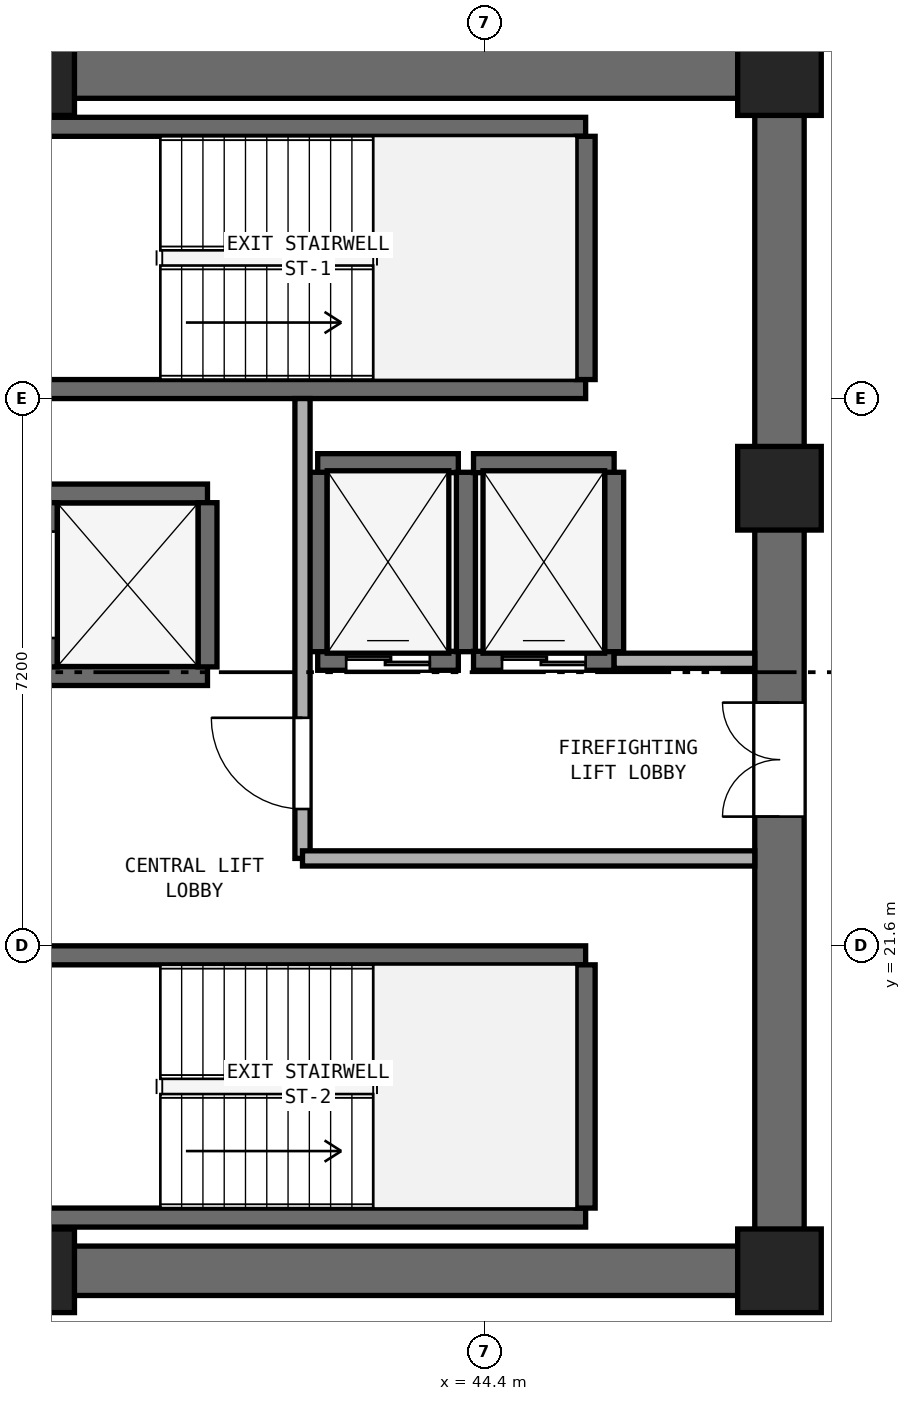
"""IFC4 building model, lengths in metres.
Left out: names, types, materials, properties, quantities, classifications, styles, units other than length and angle.
Written with IfcOpenShell. Run it as: python <this file> out.ifc"""

import sys

from ifc_helpers import new_model, si_unit, direction, frame, frame_2d, origin, origin_2d, place, context, subcontext, project, spatial, rectangle, extrude, element, fill, save


model = new_model("IFC4")
c1 = context("Model", 3, precision=1e-05, world=origin(), true_north=direction((0.0, 1.0)))
c2 = subcontext(c1, "Body", "Model", "MODEL_VIEW")
j1 = project(units=[si_unit("LENGTHUNIT", "METRE"), si_unit("PLANEANGLEUNIT", "RADIAN")], contexts=[c1])
p1 = place(None, origin())
s1 = spatial("IfcSite", under=j1, at=p1, CompositionType="ELEMENT")
p2 = place(p1, origin())
s2 = spatial("IfcBuilding", under=s1, at=p2, CompositionType="ELEMENT")
p3 = place(p2, frame((0.0, 0.0, 74.4)))
s3 = spatial("IfcBuildingStorey", under=s2, at=p3, CompositionType="ELEMENT", Elevation=74.4)
for number, where, z_axis, x_axis in (
    (1, (25.4, 17.325, 0.0), (0.0, 0.0, 1.0), (1.0, 0.0, 0.0)),
    (2, (25.4, 33.075, 0.0), (0.0, 0.0, 1.0), (1.0, 0.0, 0.0)),
):
    element("IfcWall", number, at=place(p3, frame(where, z_axis=z_axis, x_axis=x_axis)), inside=s3, PredefinedType="SHEAR", context=c2, shape_type="SweptSolid", body=[
        extrude(rectangle(XDim=23.2, YDim=0.65, at=frame_2d((11.6, 0.0))), origin(), (0.0, 0.0, 1.0), 3.525),
    ])
p4 = place(p3, frame((48.275, 17.65, 0.0), z_axis=(0.0, 0.0, 1.0), x_axis=(0.0, 1.0, 0.0)))
e3 = element("IfcWall", 3, at=p4, inside=s3, PredefinedType="SHEAR", context=c2, shape_type="SweptSolid", body=[
    extrude(rectangle(XDim=15.1, YDim=0.65, at=frame_2d((7.55, 0.0))), origin(), (0.0, 0.0, 1.0), 3.525),
])
p5 = place(p4, frame((5.65, 0.0, 0.0)))
e4 = element("IfcOpeningElement", 4, at=p5, cuts=e3, PredefinedType="OPENING", context=c2, shape_type="SweptSolid", body=[
    extrude(rectangle(XDim=1.5, YDim=2.15, at=frame_2d((0.75, 1.075))), frame((0.0, 0.335, 0.0), z_axis=(0.0, -1.0, 0.0), x_axis=(1.0, 0.0, 0.0)), (0.0, 0.0, 1.0), 0.67),
])
for number, where, z_axis, x_axis in (
    (5, (38.45, 17.325, 0.0), (0.0, 0.0, 1.0), (1.0, 0.0, 0.0)),
    (6, (48.275, 17.325, 0.0), (0.0, 0.0, 1.0), (1.0, 0.0, 0.0)),
    (7, (48.275, 27.62, 0.0), (0.0, 0.0, 1.0), (1.0, 0.0, 0.0)),
    (8, (48.275, 33.075, 0.0), (0.0, 0.0, 1.0), (1.0, 0.0, 0.0)),
    (9, (38.45, 33.075, 0.0), (0.0, 0.0, 1.0), (1.0, 0.0, 0.0)),
):
    element("IfcColumn", number, at=place(p3, frame(where, z_axis=z_axis, x_axis=x_axis)), inside=s3, PredefinedType="PILASTER", context=c2, shape_type="SweptSolid", body=[
        extrude(rectangle(XDim=1.1, YDim=1.1, at=origin_2d()), origin(), (0.0, 0.0, 1.0), 3.8),
    ])
for number, where, z_axis, x_axis in (
    (10, (38.425, 28.925, 0.0), (0.0, 0.0, 1.0), (1.0, 0.0, 0.0)),
    (11, (38.425, 32.375, 0.0), (0.0, 0.0, 1.0), (1.0, 0.0, 0.0)),
):
    element("IfcWall", number, at=place(p3, frame(where, z_axis=z_axis, x_axis=x_axis)), inside=s3, PredefinedType="SHEAR", context=c2, shape_type="SweptSolid", body=[
        extrude(rectangle(XDim=7.3, YDim=0.25, at=frame_2d((3.65, 0.0))), origin(), (0.0, 0.0, 1.0), 3.525),
    ])
p6 = place(p3, frame((45.725, 29.05, 0.0), z_axis=(0.0, 0.0, 1.0), x_axis=(0.0, 1.0, 0.0)))
e12 = element("IfcWall", 12, at=p6, inside=s3, PredefinedType="SHEAR", context=c2, shape_type="SweptSolid", body=[
    extrude(rectangle(XDim=3.2, YDim=0.25, at=frame_2d((1.6, 0.0))), origin(), (0.0, 0.0, 1.0), 3.525),
])
for number, where, z_axis, x_axis in (
    (13, (38.425, 18.025, 0.0), (0.0, 0.0, 1.0), (1.0, 0.0, 0.0)),
    (14, (38.425, 21.475, 0.0), (0.0, 0.0, 1.0), (1.0, 0.0, 0.0)),
):
    element("IfcWall", number, at=place(p3, frame(where, z_axis=z_axis, x_axis=x_axis)), inside=s3, PredefinedType="SHEAR", context=c2, shape_type="SweptSolid", body=[
        extrude(rectangle(XDim=7.3, YDim=0.25, at=frame_2d((3.65, 0.0))), origin(), (0.0, 0.0, 1.0), 3.525),
    ])
p7 = place(p3, frame((45.725, 18.15, 0.0), z_axis=(0.0, 0.0, 1.0), x_axis=(0.0, 1.0, 0.0)))
e15 = element("IfcWall", 15, at=p7, inside=s3, PredefinedType="SHEAR", context=c2, shape_type="SweptSolid", body=[
    extrude(rectangle(XDim=3.2, YDim=0.25, at=frame_2d((1.6, 0.0))), origin(), (0.0, 0.0, 1.0), 3.525),
])
p8 = place(p3, frame((42.2, 25.35, 0.0), z_axis=(0.0, 0.0, 1.0), x_axis=(1.0, 0.0, 0.0)))
e16 = element("IfcWall", 16, at=p8, inside=s3, PredefinedType="SHEAR", context=c2, shape_type="SweptSolid", body=[
    extrude(rectangle(XDim=1.85, YDim=0.25, at=frame_2d((0.925, 0.0))), origin(), (0.0, 0.0, 1.0), 3.525),
])
p9 = place(p8, frame((0.375, 0.0, 0.0)))
e17 = element("IfcOpeningElement", 17, at=p9, cuts=e16, PredefinedType="OPENING", context=c2, shape_type="SweptSolid", body=[
    extrude(rectangle(XDim=1.1, YDim=2.15, at=frame_2d((0.55, 1.075))), frame((0.0, 0.135, 0.0), z_axis=(0.0, -1.0, 0.0), x_axis=(1.0, 0.0, 0.0)), (0.0, 0.0, 1.0), 0.27),
])
p10 = place(p3, frame((42.2, 27.95, 0.0), z_axis=(0.0, 0.0, 1.0), x_axis=(1.0, 0.0, 0.0)))
e18 = element("IfcWall", 18, at=p10, inside=s3, PredefinedType="SHEAR", context=c2, shape_type="SweptSolid", body=[
    extrude(rectangle(XDim=1.85, YDim=0.25, at=frame_2d((0.925, 0.0))), origin(), (0.0, 0.0, 1.0), 3.525),
])
for number, where, z_axis, x_axis in (
    (19, (42.2, 25.47, 0.0), (0.0, 0.0, 1.0), (0.0, 1.0, 0.0)),
    (20, (44.15, 25.47, 0.0), (0.0, 0.0, 1.0), (0.0, 1.0, 0.0)),
):
    element("IfcWall", number, at=place(p3, frame(where, z_axis=z_axis, x_axis=x_axis)), inside=s3, PredefinedType="SHEAR", context=c2, shape_type="SweptSolid", body=[
        extrude(rectangle(XDim=2.36, YDim=0.25, at=frame_2d((1.18, 0.0))), origin(), (0.0, 0.0, 1.0), 3.525),
    ])
p11 = place(p3, frame((44.25, 25.35, 0.0), z_axis=(0.0, 0.0, 1.0), x_axis=(1.0, 0.0, 0.0)))
e21 = element("IfcWall", 21, at=p11, inside=s3, PredefinedType="SHEAR", context=c2, shape_type="SweptSolid", body=[
    extrude(rectangle(XDim=1.85, YDim=0.25, at=frame_2d((0.925, 0.0))), origin(), (0.0, 0.0, 1.0), 3.525),
])
p12 = place(p11, frame((0.375, 0.0, 0.0)))
e22 = element("IfcOpeningElement", 22, at=p12, cuts=e21, PredefinedType="OPENING", context=c2, shape_type="SweptSolid", body=[
    extrude(rectangle(XDim=1.1, YDim=2.15, at=frame_2d((0.55, 1.075))), frame((0.0, 0.135, 0.0), z_axis=(0.0, -1.0, 0.0), x_axis=(1.0, 0.0, 0.0)), (0.0, 0.0, 1.0), 0.27),
])
p13 = place(p3, frame((44.25, 27.95, 0.0), z_axis=(0.0, 0.0, 1.0), x_axis=(1.0, 0.0, 0.0)))
e23 = element("IfcWall", 23, at=p13, inside=s3, PredefinedType="SHEAR", context=c2, shape_type="SweptSolid", body=[
    extrude(rectangle(XDim=1.85, YDim=0.25, at=frame_2d((0.925, 0.0))), origin(), (0.0, 0.0, 1.0), 3.525),
])
p14 = place(p3, frame((46.1, 25.47, 0.0), z_axis=(0.0, 0.0, 1.0), x_axis=(0.0, 1.0, 0.0)))
e24 = element("IfcWall", 24, at=p14, inside=s3, PredefinedType="SHEAR", context=c2, shape_type="SweptSolid", body=[
    extrude(rectangle(XDim=2.36, YDim=0.25, at=frame_2d((1.18, 0.0))), origin(), (0.0, 0.0, 1.0), 3.525),
])
for number, where, z_axis, x_axis in (
    (25, (38.65, 25.15, 0.0), (0.0, 0.0, 1.0), (1.0, 0.0, 0.0)),
    (26, (38.65, 27.55, 0.0), (0.0, 0.0, 1.0), (1.0, 0.0, 0.0)),
):
    element("IfcWall", number, at=place(p3, frame(where, z_axis=z_axis, x_axis=x_axis)), inside=s3, PredefinedType="SHEAR", context=c2, shape_type="SweptSolid", body=[
        extrude(rectangle(XDim=2.1, YDim=0.25, at=frame_2d((1.05, 0.0))), origin(), (0.0, 0.0, 1.0), 3.525),
    ])
p15 = place(p3, frame((38.65, 25.27, 0.0), z_axis=(0.0, 0.0, 1.0), x_axis=(0.0, 1.0, 0.0)))
e27 = element("IfcWall", 27, at=p15, inside=s3, PredefinedType="SHEAR", context=c2, shape_type="SweptSolid", body=[
    extrude(rectangle(XDim=2.16, YDim=0.25, at=frame_2d((1.08, 0.0))), origin(), (0.0, 0.0, 1.0), 3.525),
])
p16 = place(p15, frame((0.38, 0.0, 0.0)))
e28 = element("IfcOpeningElement", 28, at=p16, cuts=e27, PredefinedType="OPENING", context=c2, shape_type="SweptSolid", body=[
    extrude(rectangle(XDim=1.4, YDim=2.2, at=frame_2d((0.7, 1.1))), frame((0.0, 0.135, 0.0), z_axis=(0.0, -1.0, 0.0), x_axis=(1.0, 0.0, 0.0)), (0.0, 0.0, 1.0), 0.27),
])
p17 = place(p3, frame((40.75, 25.27, 0.0), z_axis=(0.0, 0.0, 1.0), x_axis=(0.0, 1.0, 0.0)))
e29 = element("IfcWall", 29, at=p17, inside=s3, PredefinedType="SHEAR", context=c2, shape_type="SweptSolid", body=[
    extrude(rectangle(XDim=2.16, YDim=0.25, at=frame_2d((1.08, 0.0))), origin(), (0.0, 0.0, 1.0), 3.525),
])
p18 = place(p3, frame((42.0, 22.75, 0.0), z_axis=(0.0, 0.0, 1.0), x_axis=(0.0, 1.0, 0.0)))
e30 = element("IfcWall", 30, at=p18, inside=s3, PredefinedType="SOLIDWALL", context=c2, shape_type="SweptSolid", body=[
    extrude(rectangle(XDim=6.05, YDim=0.2, at=frame_2d((3.025, 0.0))), origin(), (0.0, 0.0, 1.0), 3.525),
])
p19 = place(p18, frame((0.65, 0.0, 0.0)))
e31 = element("IfcOpeningElement", 31, at=p19, cuts=e30, PredefinedType="OPENING", context=c2, shape_type="SweptSolid", body=[
    extrude(rectangle(XDim=1.2, YDim=2.15, at=frame_2d((0.6, 1.075))), frame((0.0, 0.11, 0.0), z_axis=(0.0, -1.0, 0.0), x_axis=(1.0, 0.0, 0.0)), (0.0, 0.0, 1.0), 0.22),
])
p20 = place(p3, frame((42.0, 22.75, 0.0), z_axis=(0.0, 0.0, 1.0), x_axis=(1.0, 0.0, 0.0)))
e32 = element("IfcWall", 32, at=p20, inside=s3, PredefinedType="SOLIDWALL", context=c2, shape_type="SweptSolid", body=[
    extrude(rectangle(XDim=5.95, YDim=0.2, at=frame_2d((2.975, 0.0))), origin(), (0.0, 0.0, 1.0), 3.525),
])
p21 = place(p3, frame((46.1, 25.35, 0.0), z_axis=(0.0, 0.0, 1.0), x_axis=(1.0, 0.0, 0.0)))
e33 = element("IfcWall", 33, at=p21, inside=s3, PredefinedType="SOLIDWALL", context=c2, shape_type="SweptSolid", body=[
    extrude(rectangle(XDim=1.85, YDim=0.2, at=frame_2d((0.925, 0.0))), origin(), (0.0, 0.0, 1.0), 3.525),
])
p22 = place(p9, origin())
e34 = element("IfcDoor", 34, at=p22, inside=s3, OperationType="DOUBLE_DOOR_SLIDING", PredefinedType="DOOR", context=c2, shape_type="SweptSolid", body=[
    extrude(rectangle(XDim=1.1, YDim=2.15, at=frame_2d((0.55, 1.075))), frame((0.0, 0.025, 0.0), z_axis=(0.0, -1.0, 0.0), x_axis=(1.0, 0.0, 0.0)), (0.0, 0.0, 1.0), 0.05),
])
fill(e17, e34)
p23 = place(p12, origin())
e35 = element("IfcDoor", 35, at=p23, inside=s3, OperationType="DOUBLE_DOOR_SLIDING", PredefinedType="DOOR", context=c2, shape_type="SweptSolid", body=[
    extrude(rectangle(XDim=1.1, YDim=2.15, at=frame_2d((0.55, 1.075))), frame((0.0, 0.025, 0.0), z_axis=(0.0, -1.0, 0.0), x_axis=(1.0, 0.0, 0.0)), (0.0, 0.0, 1.0), 0.05),
])
fill(e22, e35)
p24 = place(p19, origin())
e36 = element("IfcDoor", 36, at=p24, inside=s3, OperationType="SINGLE_SWING_RIGHT", PredefinedType="DOOR", context=c2, shape_type="SweptSolid", body=[
    extrude(rectangle(XDim=1.2, YDim=2.15, at=frame_2d((0.6, 1.075))), frame((0.0, 0.025, 0.0), z_axis=(0.0, -1.0, 0.0), x_axis=(1.0, 0.0, 0.0)), (0.0, 0.0, 1.0), 0.05),
])
fill(e31, e36)
p25 = place(p5, origin())
e37 = element("IfcDoor", 37, at=p25, inside=s3, OperationType="DOUBLE_DOOR_SINGLE_SWING", PredefinedType="DOOR", context=c2, shape_type="SweptSolid", body=[
    extrude(rectangle(XDim=1.5, YDim=2.15, at=frame_2d((0.75, 1.075))), frame((0.0, 0.025, 0.0), z_axis=(0.0, -1.0, 0.0), x_axis=(1.0, 0.0, 0.0)), (0.0, 0.0, 1.0), 0.05),
])
fill(e4, e37)
save(model, sys.argv[1])
